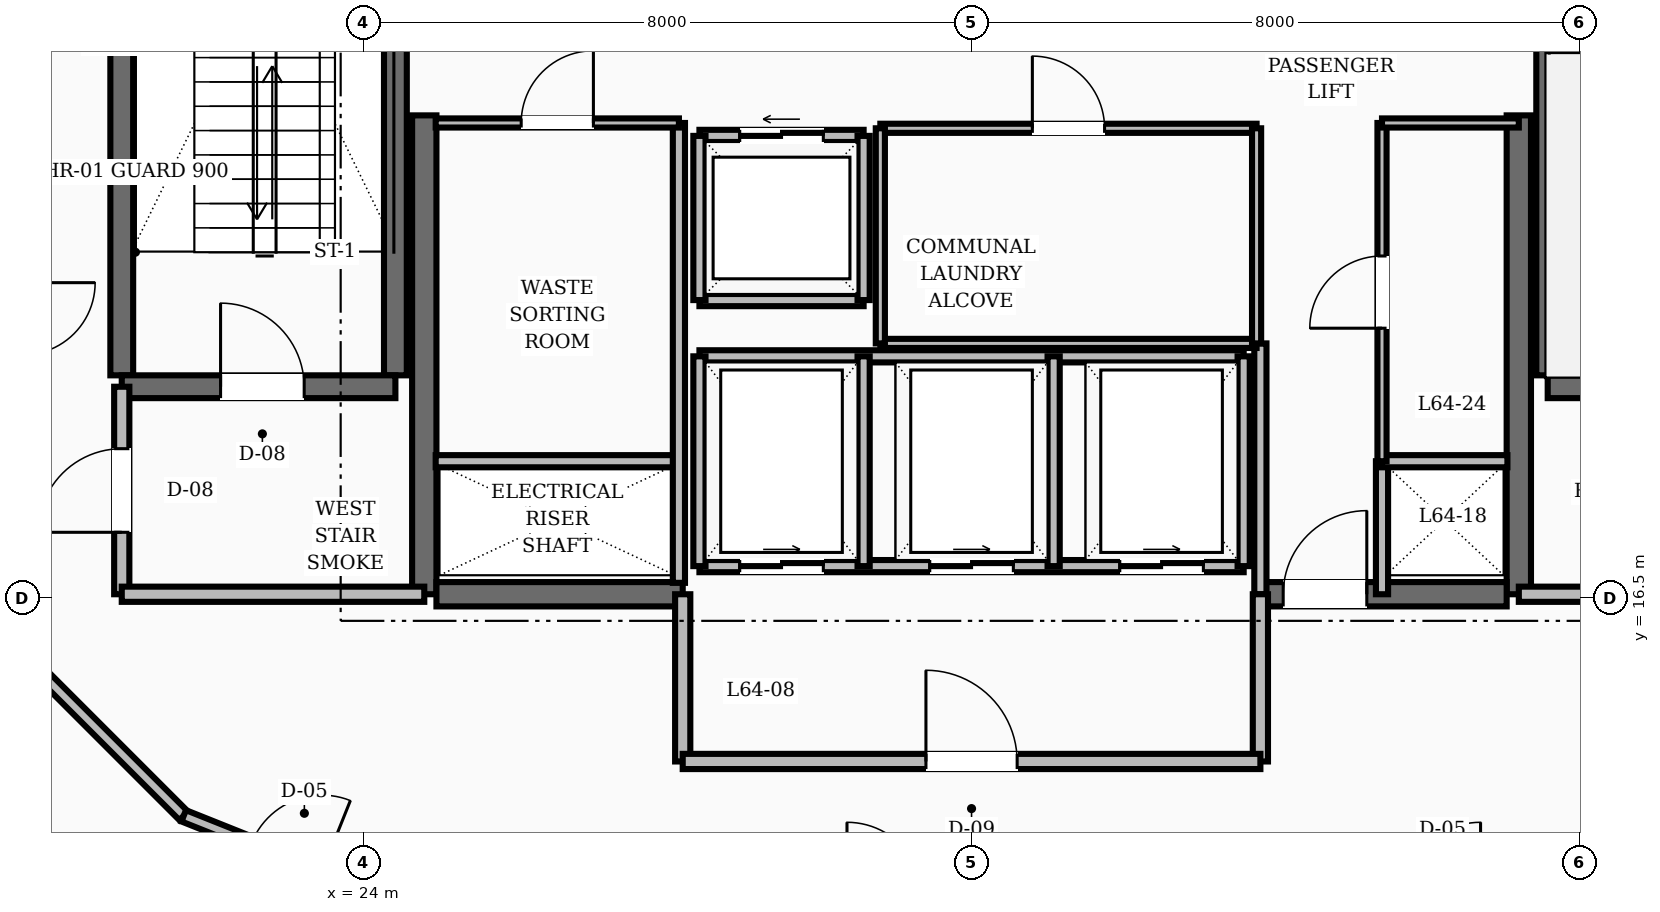
"""IFC4 building model, lengths in metres.
Left out: names, types, materials, properties, quantities, classifications, styles, units other than length and angle.
Written with IfcOpenShell. Run it as: python <this file> out.ifc"""

import sys

from ifc_helpers import new_model, si_unit, direction, frame, frame_2d, origin, place, context, subcontext, project, spatial, rectangle, extrude, element, fill, save


model = new_model("IFC4")
c1 = context("Model", 3, precision=1e-05, world=origin(), true_north=direction((0.0, 1.0)))
c2 = subcontext(c1, "Body", "Model", "MODEL_VIEW")
j1 = project(units=[si_unit("LENGTHUNIT", "METRE"), si_unit("PLANEANGLEUNIT", "RADIAN")], contexts=[c1])
p1 = place(None, origin())
s1 = spatial("IfcSite", under=j1, at=p1, CompositionType="ELEMENT")
p2 = place(p1, origin())
s2 = spatial("IfcBuilding", under=s1, at=p2, CompositionType="ELEMENT")
p3 = place(p2, frame((0.0, 0.0, 247.2)))
s3 = spatial("IfcBuildingStorey", under=s2, at=p3, CompositionType="ELEMENT", Elevation=247.2)
for number, where, z_axis, x_axis in (
    (1, (24.8, 16.55, 0.0), (0.0, 0.0, 1.0), (0.0, 1.0, 0.0)),
    (2, (39.2, 16.55, 0.0), (0.0, 0.0, 1.0), (0.0, 1.0, 0.0)),
):
    element("IfcWall", number, at=place(p3, frame(where, z_axis=z_axis, x_axis=x_axis)), inside=s3, PredefinedType="SHEAR", context=c2, shape_type="SweptSolid", body=[
        extrude(rectangle(XDim=6.3, YDim=0.32, at=frame_2d((3.15, 0.0))), origin(), (0.0, 0.0, 1.0), 3.6),
    ])
p4 = place(p3, frame((24.96, 16.55, 0.0), z_axis=(0.0, 0.0, 1.0), x_axis=(1.0, 0.0, 0.0)))
e3 = element("IfcWall", 3, at=p4, inside=s3, PredefinedType="SHEAR", context=c2, shape_type="SweptSolid", body=[
    extrude(rectangle(XDim=3.24, YDim=0.32, at=frame_2d((1.62, 0.0))), origin(), (0.0, 0.0, 1.0), 3.6),
])
p5 = place(p3, frame((35.8, 16.55, 0.0), z_axis=(0.0, 0.0, 1.0), x_axis=(1.0, 0.0, 0.0)))
e4 = element("IfcWall", 4, at=p5, inside=s3, PredefinedType="SHEAR", context=c2, shape_type="SweptSolid", body=[
    extrude(rectangle(XDim=3.24, YDim=0.32, at=frame_2d((1.62, 0.0))), origin(), (0.0, 0.0, 1.0), 3.6),
])
p6 = place(p5, frame((0.3, 0.0, 0.0)))
e5 = element("IfcOpeningElement", 5, at=p6, cuts=e4, PredefinedType="OPENING", context=c2, shape_type="SweptSolid", body=[
    extrude(rectangle(XDim=1.1, YDim=2.1, at=frame_2d((0.55, 1.05))), frame((0.0, 0.17, 0.0), z_axis=(0.0, -1.0, 0.0), x_axis=(1.0, 0.0, 0.0)), (0.0, 0.0, 1.0), 0.34),
])
for number, where, z_axis, x_axis in (
    (6, (20.82, 19.43, 0.0), (0.0, 0.0, 1.0), (0.0, 1.0, 0.0)),
    (7, (24.42, 19.43, 0.0), (0.0, 0.0, 1.0), (0.0, 1.0, 0.0)),
):
    element("IfcWall", number, at=place(p3, frame(where, z_axis=z_axis, x_axis=x_axis)), inside=s3, PredefinedType="SHEAR", context=c2, shape_type="SweptSolid", body=[
        extrude(rectangle(XDim=8.74, YDim=0.3, at=frame_2d((4.37, 0.0))), origin(), (0.0, 0.0, 1.0), 3.6),
    ])
p7 = place(p3, frame((20.82, 19.28, 0.0), z_axis=(0.0, 0.0, 1.0), x_axis=(1.0, 0.0, 0.0)))
e8 = element("IfcWall", 8, at=p7, inside=s3, PredefinedType="SHEAR", context=c2, shape_type="SweptSolid", body=[
    extrude(rectangle(XDim=3.6, YDim=0.3, at=frame_2d((1.8, 0.0))), origin(), (0.0, 0.0, 1.0), 3.6),
])
p8 = place(p7, frame((1.3, 0.0, 0.0)))
e9 = element("IfcOpeningElement", 9, at=p8, cuts=e8, PredefinedType="OPENING", context=c2, shape_type="SweptSolid", body=[
    extrude(rectangle(XDim=1.1, YDim=2.1, at=frame_2d((0.55, 1.05))), frame((0.0, 0.16, 0.0), z_axis=(0.0, -1.0, 0.0), x_axis=(1.0, 0.0, 0.0)), (0.0, 0.0, 1.0), 0.32),
])
p9 = place(p3, frame((39.58, 19.43, 0.0), z_axis=(0.0, 0.0, 1.0), x_axis=(0.0, 1.0, 0.0)))
e10 = element("IfcWall", 10, at=p9, inside=s3, PredefinedType="SHEAR", context=c2, shape_type="SweptSolid", body=[
    extrude(rectangle(XDim=8.74, YDim=0.3, at=frame_2d((4.37, 0.0))), origin(), (0.0, 0.0, 1.0), 3.6),
])
p10 = place(p3, frame((39.58, 19.28, 0.0), z_axis=(0.0, 0.0, 1.0), x_axis=(1.0, 0.0, 0.0)))
e11 = element("IfcWall", 11, at=p10, inside=s3, PredefinedType="SHEAR", context=c2, shape_type="SweptSolid", body=[
    extrude(rectangle(XDim=3.6, YDim=0.3, at=frame_2d((1.8, 0.0))), origin(), (0.0, 0.0, 1.0), 3.6),
])
p11 = place(p3, frame((20.82, 16.55, 0.0), z_axis=(0.0, 0.0, 1.0), x_axis=(0.0, 1.0, 0.0)))
e12 = element("IfcWall", 12, at=p11, inside=s3, PredefinedType="SOLIDWALL", context=c2, shape_type="SweptSolid", body=[
    extrude(rectangle(XDim=2.73, YDim=0.2, at=frame_2d((1.365, 0.0))), origin(), (0.0, 0.0, 1.0), 2.87),
])
p12 = place(p11, frame((0.815, 0.0, 0.0)))
e13 = element("IfcOpeningElement", 13, at=p12, cuts=e12, PredefinedType="OPENING", context=c2, shape_type="SweptSolid", body=[
    extrude(rectangle(XDim=1.1, YDim=2.1, at=frame_2d((0.55, 1.05))), frame((0.0, 0.11, 0.0), z_axis=(0.0, -1.0, 0.0), x_axis=(1.0, 0.0, 0.0)), (0.0, 0.0, 1.0), 0.22),
])
for number, where, z_axis, x_axis in (
    (14, (20.82, 16.55, 0.0), (0.0, 0.0, 1.0), (1.0, 0.0, 0.0)),
    (15, (39.2, 16.55, 0.0), (0.0, 0.0, 1.0), (1.0, 0.0, 0.0)),
):
    element("IfcWall", number, at=place(p3, frame(where, z_axis=z_axis, x_axis=x_axis)), inside=s3, PredefinedType="SOLIDWALL", context=c2, shape_type="SweptSolid", body=[
        extrude(rectangle(XDim=3.98, YDim=0.2, at=frame_2d((1.99, 0.0))), origin(), (0.0, 0.0, 1.0), 2.87),
    ])
p13 = place(p3, frame((35.8, 16.55, 0.0), z_axis=(0.0, 0.0, 1.0), x_axis=(0.0, 1.0, 0.0)))
e16 = element("IfcWall", 16, at=p13, inside=s3, PredefinedType="SOLIDWALL", context=c2, shape_type="SweptSolid", body=[
    extrude(rectangle(XDim=3.3, YDim=0.16, at=frame_2d((1.65, 0.0))), origin(), (0.0, 0.0, 1.0), 2.87),
])
p14 = place(p3, frame((37.4, 16.55, 0.0), z_axis=(0.0, 0.0, 1.0), x_axis=(0.0, 1.0, 0.0)))
e17 = element("IfcWall", 17, at=p14, inside=s3, PredefinedType="SOLIDWALL", context=c2, shape_type="SweptSolid", body=[
    extrude(rectangle(XDim=1.75, YDim=0.16, at=frame_2d((0.875, 0.0))), origin(), (0.0, 0.0, 1.0), 2.87),
])
for number, where, z_axis, x_axis in (
    (18, (28.2, 14.35, 0.0), (0.0, 0.0, 1.0), (0.0, 1.0, 0.0)),
    (19, (35.8, 14.35, 0.0), (0.0, 0.0, 1.0), (0.0, 1.0, 0.0)),
):
    element("IfcWall", number, at=place(p3, frame(where, z_axis=z_axis, x_axis=x_axis)), inside=s3, PredefinedType="SOLIDWALL", context=c2, shape_type="SweptSolid", body=[
        extrude(rectangle(XDim=2.2, YDim=0.2, at=frame_2d((1.1, 0.0))), origin(), (0.0, 0.0, 1.0), 2.87),
    ])
p15 = place(p3, frame((28.2, 14.35, 0.0), z_axis=(0.0, 0.0, 1.0), x_axis=(1.0, 0.0, 0.0)))
e20 = element("IfcWall", 20, at=p15, inside=s3, PredefinedType="SOLIDWALL", context=c2, shape_type="SweptSolid", body=[
    extrude(rectangle(XDim=7.6, YDim=0.2, at=frame_2d((3.8, 0.0))), origin(), (0.0, 0.0, 1.0), 2.87),
])
p16 = place(p15, frame((3.2, 0.0, 0.0)))
e21 = element("IfcOpeningElement", 21, at=p16, cuts=e20, PredefinedType="OPENING", context=c2, shape_type="SweptSolid", body=[
    extrude(rectangle(XDim=1.2, YDim=2.1, at=frame_2d((0.6, 1.05))), frame((0.0, 0.11, 0.0), z_axis=(0.0, -1.0, 0.0), x_axis=(1.0, 0.0, 0.0)), (0.0, 0.0, 1.0), 0.22),
])
p17 = place(p3, frame((28.42, 22.58, 0.0), z_axis=(0.0, 0.0, 1.0), x_axis=(1.0, 0.0, 0.0)))
e22 = element("IfcWall", 22, at=p17, inside=s3, PredefinedType="SOLIDWALL", context=c2, shape_type="SweptSolid", body=[
    extrude(rectangle(XDim=2.16, YDim=0.16, at=frame_2d((1.08, 0.0))), origin(), (0.0, 0.0, 1.0), 2.87),
])
p18 = place(p17, frame((0.53, 0.0, 0.0)))
e23 = element("IfcOpeningElement", 23, at=p18, cuts=e22, PredefinedType="OPENING", context=c2, shape_type="SweptSolid", body=[
    extrude(rectangle(XDim=1.1, YDim=2.15, at=frame_2d((0.55, 1.075))), frame((0.0, 0.09, 0.0), z_axis=(0.0, -1.0, 0.0), x_axis=(1.0, 0.0, 0.0)), (0.0, 0.0, 1.0), 0.18),
])
for number, where, z_axis, x_axis in (
    (24, (28.42, 20.42, 0.0), (0.0, 0.0, 1.0), (1.0, 0.0, 0.0)),
    (25, (28.42, 20.42, 0.0), (0.0, 0.0, 1.0), (0.0, 1.0, 0.0)),
    (26, (30.58, 20.42, 0.0), (0.0, 0.0, 1.0), (0.0, 1.0, 0.0)),
):
    element("IfcWall", number, at=place(p3, frame(where, z_axis=z_axis, x_axis=x_axis)), inside=s3, PredefinedType="SOLIDWALL", context=c2, shape_type="SweptSolid", body=[
        extrude(rectangle(XDim=2.16, YDim=0.16, at=frame_2d((1.08, 0.0))), origin(), (0.0, 0.0, 1.0), 2.87),
    ])
p19 = place(p3, frame((28.42, 16.92, 0.0), z_axis=(0.0, 0.0, 1.0), x_axis=(1.0, 0.0, 0.0)))
e27 = element("IfcWall", 27, at=p19, inside=s3, PredefinedType="SOLIDWALL", context=c2, shape_type="SweptSolid", body=[
    extrude(rectangle(XDim=7.16, YDim=0.16, at=frame_2d((3.58, 0.0))), origin(), (0.0, 0.0, 1.0), 2.87),
])
p20 = place(p19, frame((0.53, 0.0, 0.0)))
e28 = element("IfcOpeningElement", 28, at=p20, cuts=e27, PredefinedType="OPENING", context=c2, shape_type="SweptSolid", body=[
    extrude(rectangle(XDim=1.1, YDim=2.15, at=frame_2d((0.55, 1.075))), frame((0.0, 0.09, 0.0), z_axis=(0.0, -1.0, 0.0), x_axis=(1.0, 0.0, 0.0)), (0.0, 0.0, 1.0), 0.18),
])
p21 = place(p19, frame((3.03, 0.0, 0.0)))
e29 = element("IfcOpeningElement", 29, at=p21, cuts=e27, PredefinedType="OPENING", context=c2, shape_type="SweptSolid", body=[
    extrude(rectangle(XDim=1.1, YDim=2.15, at=frame_2d((0.55, 1.075))), frame((0.0, 0.09, 0.0), z_axis=(0.0, -1.0, 0.0), x_axis=(1.0, 0.0, 0.0)), (0.0, 0.0, 1.0), 0.18),
])
p22 = place(p19, frame((5.53, 0.0, 0.0)))
e30 = element("IfcOpeningElement", 30, at=p22, cuts=e27, PredefinedType="OPENING", context=c2, shape_type="SweptSolid", body=[
    extrude(rectangle(XDim=1.1, YDim=2.15, at=frame_2d((0.55, 1.075))), frame((0.0, 0.09, 0.0), z_axis=(0.0, -1.0, 0.0), x_axis=(1.0, 0.0, 0.0)), (0.0, 0.0, 1.0), 0.18),
])
p23 = place(p3, frame((28.42, 19.68, 0.0), z_axis=(0.0, 0.0, 1.0), x_axis=(1.0, 0.0, 0.0)))
e31 = element("IfcWall", 31, at=p23, inside=s3, PredefinedType="SOLIDWALL", context=c2, shape_type="SweptSolid", body=[
    extrude(rectangle(XDim=7.16, YDim=0.16, at=frame_2d((3.58, 0.0))), origin(), (0.0, 0.0, 1.0), 2.87),
])
for number, where, z_axis, x_axis in (
    (32, (28.42, 16.92, 0.0), (0.0, 0.0, 1.0), (0.0, 1.0, 0.0)),
    (33, (30.58, 16.92, 0.0), (0.0, 0.0, 1.0), (0.0, 1.0, 0.0)),
    (34, (33.08, 16.92, 0.0), (0.0, 0.0, 1.0), (0.0, 1.0, 0.0)),
    (35, (35.58, 16.92, 0.0), (0.0, 0.0, 1.0), (0.0, 1.0, 0.0)),
):
    element("IfcWall", number, at=place(p3, frame(where, z_axis=z_axis, x_axis=x_axis)), inside=s3, PredefinedType="SOLIDWALL", context=c2, shape_type="SweptSolid", body=[
        extrude(rectangle(XDim=2.76, YDim=0.16, at=frame_2d((1.38, 0.0))), origin(), (0.0, 0.0, 1.0), 2.87),
    ])
p24 = place(p3, frame((30.8, 22.68, 0.0), z_axis=(0.0, 0.0, 1.0), x_axis=(1.0, 0.0, 0.0)))
e36 = element("IfcWall", 36, at=p24, inside=s3, PredefinedType="PARTITIONING", context=c2, shape_type="SweptSolid", body=[
    extrude(rectangle(XDim=4.95, YDim=0.12, at=frame_2d((2.475, 0.0))), origin(), (0.0, 0.0, 1.0), 2.87),
])
p25 = place(p24, frame((2.0, 0.0, 0.0)))
e37 = element("IfcOpeningElement", 37, at=p25, cuts=e36, PredefinedType="OPENING", context=c2, shape_type="SweptSolid", body=[
    extrude(rectangle(XDim=0.95, YDim=2.1, at=frame_2d((0.475, 1.05))), frame((0.0, 0.07, 0.0), z_axis=(0.0, -1.0, 0.0), x_axis=(1.0, 0.0, 0.0)), (0.0, 0.0, 1.0), 0.14),
])
p26 = place(p3, frame((30.8, 19.85, 0.0), z_axis=(0.0, 0.0, 1.0), x_axis=(1.0, 0.0, 0.0)))
e38 = element("IfcWall", 38, at=p26, inside=s3, PredefinedType="PARTITIONING", context=c2, shape_type="SweptSolid", body=[
    extrude(rectangle(XDim=4.95, YDim=0.12, at=frame_2d((2.475, 0.0))), origin(), (0.0, 0.0, 1.0), 2.87),
])
for number, where, z_axis, x_axis in (
    (39, (30.8, 19.85, 0.0), (0.0, 0.0, 1.0), (0.0, 1.0, 0.0)),
    (40, (35.75, 19.85, 0.0), (0.0, 0.0, 1.0), (0.0, 1.0, 0.0)),
):
    element("IfcWall", number, at=place(p3, frame(where, z_axis=z_axis, x_axis=x_axis)), inside=s3, PredefinedType="PARTITIONING", context=c2, shape_type="SweptSolid", body=[
        extrude(rectangle(XDim=2.83, YDim=0.12, at=frame_2d((1.415, 0.0))), origin(), (0.0, 0.0, 1.0), 2.87),
    ])
p27 = place(p3, frame((24.95, 18.3, 0.0), z_axis=(0.0, 0.0, 1.0), x_axis=(1.0, 0.0, 0.0)))
e41 = element("IfcWall", 41, at=p27, inside=s3, PredefinedType="SOLIDWALL", context=c2, shape_type="SweptSolid", body=[
    extrude(rectangle(XDim=3.2, YDim=0.16, at=frame_2d((1.6, 0.0))), origin(), (0.0, 0.0, 1.0), 2.87),
])
p28 = place(p3, frame((28.15, 16.7, 0.0), z_axis=(0.0, 0.0, 1.0), x_axis=(0.0, 1.0, 0.0)))
e42 = element("IfcWall", 42, at=p28, inside=s3, PredefinedType="SOLIDWALL", context=c2, shape_type="SweptSolid", body=[
    extrude(rectangle(XDim=6.05, YDim=0.16, at=frame_2d((3.025, 0.0))), origin(), (0.0, 0.0, 1.0), 2.87),
])
p29 = place(p3, frame((37.4, 18.3, 0.0), z_axis=(0.0, 0.0, 1.0), x_axis=(1.0, 0.0, 0.0)))
e43 = element("IfcWall", 43, at=p29, inside=s3, PredefinedType="SOLIDWALL", context=c2, shape_type="SweptSolid", body=[
    extrude(rectangle(XDim=1.65, YDim=0.16, at=frame_2d((0.825, 0.0))), origin(), (0.0, 0.0, 1.0), 2.87),
])
p30 = place(p3, frame((24.95, 22.75, 0.0), z_axis=(0.0, 0.0, 1.0), x_axis=(1.0, 0.0, 0.0)))
e44 = element("IfcWall", 44, at=p30, inside=s3, PredefinedType="PARTITIONING", context=c2, shape_type="SweptSolid", body=[
    extrude(rectangle(XDim=3.2, YDim=0.12, at=frame_2d((1.6, 0.0))), origin(), (0.0, 0.0, 1.0), 2.87),
])
p31 = place(p30, frame((1.125, 0.0, 0.0)))
e45 = element("IfcOpeningElement", 45, at=p31, cuts=e44, PredefinedType="OPENING", context=c2, shape_type="SweptSolid", body=[
    extrude(rectangle(XDim=0.95, YDim=2.1, at=frame_2d((0.475, 1.05))), frame((0.0, 0.07, 0.0), z_axis=(0.0, -1.0, 0.0), x_axis=(1.0, 0.0, 0.0)), (0.0, 0.0, 1.0), 0.14),
])
p32 = place(p3, frame((37.4, 18.3, 0.0), z_axis=(0.0, 0.0, 1.0), x_axis=(0.0, 1.0, 0.0)))
e46 = element("IfcWall", 46, at=p32, inside=s3, PredefinedType="PARTITIONING", context=c2, shape_type="SweptSolid", body=[
    extrude(rectangle(XDim=4.45, YDim=0.12, at=frame_2d((2.225, 0.0))), origin(), (0.0, 0.0, 1.0), 2.87),
])
p33 = place(p32, frame((1.75, 0.0, 0.0)))
e47 = element("IfcOpeningElement", 47, at=p33, cuts=e46, PredefinedType="OPENING", context=c2, shape_type="SweptSolid", body=[
    extrude(rectangle(XDim=0.95, YDim=2.1, at=frame_2d((0.475, 1.05))), frame((0.0, 0.07, 0.0), z_axis=(0.0, -1.0, 0.0), x_axis=(1.0, 0.0, 0.0)), (0.0, 0.0, 1.0), 0.14),
])
p34 = place(p3, frame((37.4, 22.75, 0.0), z_axis=(0.0, 0.0, 1.0), x_axis=(1.0, 0.0, 0.0)))
e48 = element("IfcWall", 48, at=p34, inside=s3, PredefinedType="PARTITIONING", context=c2, shape_type="SweptSolid", body=[
    extrude(rectangle(XDim=1.8, YDim=0.12, at=frame_2d((0.9, 0.0))), origin(), (0.0, 0.0, 1.0), 2.87),
])
p35 = place(p3, frame((19.573, 15.697, 0.0), z_axis=(0.0, 0.0, 1.0), x_axis=(0.707106781187, -0.707106781187, 0.0)))
e49 = element("IfcWall", 49, at=p35, inside=s3, PredefinedType="SOLIDWALL", context=c2, shape_type="SweptSolid", body=[
    extrude(rectangle(XDim=2.916, YDim=0.16, at=frame_2d((1.458, 0.0))), origin(), (0.0, 0.0, 1.0), 2.87),
])
p36 = place(p3, frame((21.635, 13.635, 0.0), z_axis=(0.0, 0.0, 1.0), x_axis=(0.92856882165, -0.371160266542, 0.0)))
e50 = element("IfcWall", 50, at=p36, inside=s3, PredefinedType="SOLIDWALL", context=c2, shape_type="SweptSolid", body=[
    extrude(rectangle(XDim=2.923, YDim=0.16, at=frame_2d((1.461, 0.0))), origin(), (0.0, 0.0, 1.0), 2.87),
])
p37 = place(p36, frame((0.962, 0.0, 0.0)))
e51 = element("IfcOpeningElement", 51, at=p37, cuts=e50, PredefinedType="OPENING", context=c2, shape_type="SweptSolid", body=[
    extrude(rectangle(XDim=1.0, YDim=2.1, at=frame_2d((0.5, 1.05))), frame((0.0, 0.09, 0.0), z_axis=(0.0, -1.0, 0.0), x_axis=(1.0, 0.0, 0.0)), (0.0, 0.0, 1.0), 0.18),
])
p38 = place(p3, frame((39.651, 12.55, 0.0), z_axis=(0.0, 0.0, 1.0), x_axis=(0.92856882165, 0.371160266542, 0.0)))
e52 = element("IfcWall", 52, at=p38, inside=s3, PredefinedType="SOLIDWALL", context=c2, shape_type="SweptSolid", body=[
    extrude(rectangle(XDim=2.923, YDim=0.16, at=frame_2d((1.461, 0.0))), origin(), (0.0, 0.0, 1.0), 2.87),
])
p39 = place(p8, origin())
e53 = element("IfcDoor", 53, at=p39, inside=s3, OperationType="SINGLE_SWING_LEFT", PredefinedType="DOOR", context=c2, shape_type="SweptSolid", body=[
    extrude(rectangle(XDim=1.1, YDim=2.1, at=frame_2d((0.55, 1.05))), frame((0.0, 0.025, 0.0), z_axis=(0.0, -1.0, 0.0), x_axis=(1.0, 0.0, 0.0)), (0.0, 0.0, 1.0), 0.05),
])
fill(e9, e53)
p40 = place(p12, origin())
e54 = element("IfcDoor", 54, at=p40, inside=s3, OperationType="SINGLE_SWING_LEFT", PredefinedType="DOOR", context=c2, shape_type="SweptSolid", body=[
    extrude(rectangle(XDim=1.1, YDim=2.1, at=frame_2d((0.55, 1.05))), frame((0.0, 0.025, 0.0), z_axis=(0.0, -1.0, 0.0), x_axis=(1.0, 0.0, 0.0)), (0.0, 0.0, 1.0), 0.05),
])
fill(e13, e54)
p41 = place(p6, origin())
e55 = element("IfcDoor", 55, at=p41, inside=s3, OperationType="SINGLE_SWING_RIGHT", PredefinedType="DOOR", context=c2, shape_type="SweptSolid", body=[
    extrude(rectangle(XDim=1.1, YDim=2.1, at=frame_2d((0.55, 1.05))), frame((0.0, 0.025, 0.0), z_axis=(0.0, -1.0, 0.0), x_axis=(1.0, 0.0, 0.0)), (0.0, 0.0, 1.0), 0.05),
])
fill(e5, e55)
p42 = place(p16, origin())
e56 = element("IfcDoor", 56, at=p42, inside=s3, OperationType="SINGLE_SWING_LEFT", PredefinedType="DOOR", context=c2, shape_type="SweptSolid", body=[
    extrude(rectangle(XDim=1.2, YDim=2.1, at=frame_2d((0.6, 1.05))), frame((0.0, 0.025, 0.0), z_axis=(0.0, -1.0, 0.0), x_axis=(1.0, 0.0, 0.0)), (0.0, 0.0, 1.0), 0.05),
])
fill(e21, e56)
p43 = place(p18, origin())
e57 = element("IfcDoor", 57, at=p43, inside=s3, OperationType="SLIDING_TO_LEFT", PredefinedType="DOOR", context=c2, shape_type="SweptSolid", body=[
    extrude(rectangle(XDim=1.1, YDim=2.15, at=frame_2d((0.55, 1.075))), frame((0.0, 0.025, 0.0), z_axis=(0.0, -1.0, 0.0), x_axis=(1.0, 0.0, 0.0)), (0.0, 0.0, 1.0), 0.05),
])
fill(e23, e57)
p44 = place(p20, origin())
e58 = element("IfcDoor", 58, at=p44, inside=s3, OperationType="SLIDING_TO_RIGHT", PredefinedType="DOOR", context=c2, shape_type="SweptSolid", body=[
    extrude(rectangle(XDim=1.1, YDim=2.15, at=frame_2d((0.55, 1.075))), frame((0.0, 0.025, 0.0), z_axis=(0.0, -1.0, 0.0), x_axis=(1.0, 0.0, 0.0)), (0.0, 0.0, 1.0), 0.05),
])
fill(e28, e58)
p45 = place(p21, origin())
e59 = element("IfcDoor", 59, at=p45, inside=s3, OperationType="SLIDING_TO_RIGHT", PredefinedType="DOOR", context=c2, shape_type="SweptSolid", body=[
    extrude(rectangle(XDim=1.1, YDim=2.15, at=frame_2d((0.55, 1.075))), frame((0.0, 0.025, 0.0), z_axis=(0.0, -1.0, 0.0), x_axis=(1.0, 0.0, 0.0)), (0.0, 0.0, 1.0), 0.05),
])
fill(e29, e59)
p46 = place(p22, origin())
e60 = element("IfcDoor", 60, at=p46, inside=s3, OperationType="SLIDING_TO_RIGHT", PredefinedType="DOOR", context=c2, shape_type="SweptSolid", body=[
    extrude(rectangle(XDim=1.1, YDim=2.15, at=frame_2d((0.55, 1.075))), frame((0.0, 0.025, 0.0), z_axis=(0.0, -1.0, 0.0), x_axis=(1.0, 0.0, 0.0)), (0.0, 0.0, 1.0), 0.05),
])
fill(e30, e60)
p47 = place(p25, origin())
e61 = element("IfcDoor", 61, at=p47, inside=s3, OperationType="SINGLE_SWING_LEFT", PredefinedType="DOOR", context=c2, shape_type="SweptSolid", body=[
    extrude(rectangle(XDim=0.95, YDim=2.1, at=frame_2d((0.475, 1.05))), frame((0.0, 0.025, 0.0), z_axis=(0.0, -1.0, 0.0), x_axis=(1.0, 0.0, 0.0)), (0.0, 0.0, 1.0), 0.05),
])
fill(e37, e61)
p48 = place(p31, origin())
e62 = element("IfcDoor", 62, at=p48, inside=s3, OperationType="SINGLE_SWING_RIGHT", PredefinedType="DOOR", context=c2, shape_type="SweptSolid", body=[
    extrude(rectangle(XDim=0.95, YDim=2.1, at=frame_2d((0.475, 1.05))), frame((0.0, 0.025, 0.0), z_axis=(0.0, -1.0, 0.0), x_axis=(1.0, 0.0, 0.0)), (0.0, 0.0, 1.0), 0.05),
])
fill(e45, e62)
p49 = place(p33, origin())
e63 = element("IfcDoor", 63, at=p49, inside=s3, OperationType="SINGLE_SWING_LEFT", PredefinedType="DOOR", context=c2, shape_type="SweptSolid", body=[
    extrude(rectangle(XDim=0.95, YDim=2.1, at=frame_2d((0.475, 1.05))), frame((0.0, 0.025, 0.0), z_axis=(0.0, -1.0, 0.0), x_axis=(1.0, 0.0, 0.0)), (0.0, 0.0, 1.0), 0.05),
])
fill(e47, e63)
save(model, sys.argv[1])
